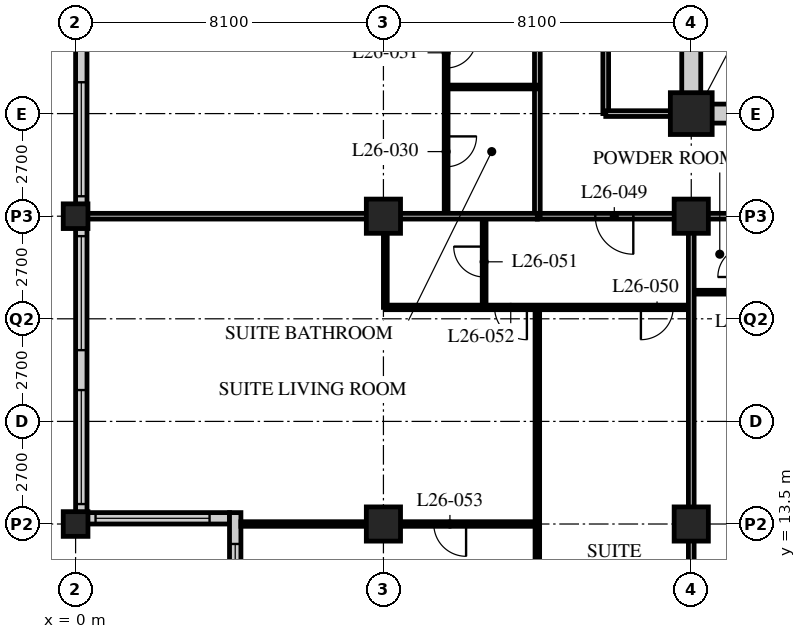
"""IFC4 building model, lengths in metres.
Left out: names, types, materials, properties, quantities, classifications, styles, units other than length and angle.
Written with IfcOpenShell. Run it as: python <this file> out.ifc"""

import sys

from ifc_helpers import new_model, si_unit, direction, frame, frame_2d, origin, origin_2d, place, context, subcontext, project, spatial, rectangle, hollow_rectangle, extrude, element, fill, save


model = new_model("IFC4")
c1 = context("Model", 3, precision=1e-05, world=origin(), true_north=direction((0.0, 1.0)))
c2 = subcontext(c1, "Body", "Model", "MODEL_VIEW")
j1 = project(units=[si_unit("LENGTHUNIT", "METRE"), si_unit("PLANEANGLEUNIT", "RADIAN")], contexts=[c1])
p1 = place(None, origin())
s1 = spatial("IfcSite", under=j1, at=p1, CompositionType="ELEMENT")
p2 = place(p1, origin())
s2 = spatial("IfcBuilding", under=s1, at=p2, CompositionType="ELEMENT")
p3 = place(p2, frame((0.0, 0.0, 106.8)))
s3 = spatial("IfcBuildingStorey", under=s2, at=p3, CompositionType="ELEMENT", Elevation=106.8)
for number, where, z_axis, x_axis in (
    (1, (0.0, 13.5, 0.0), (0.0, 0.0, 1.0), (1.0, 0.0, 0.0)),
    (2, (0.0, 21.6, 0.0), (0.0, 0.0, 1.0), (1.0, 0.0, 0.0)),
):
    element("IfcColumn", number, at=place(p3, frame(where, z_axis=z_axis, x_axis=x_axis)), inside=s3, PredefinedType="COLUMN", context=c2, shape_type="SweptSolid", body=[
        extrude(hollow_rectangle(XDim=0.65, YDim=0.65, WallThickness=0.055, at=origin_2d()), origin(), (0.0, 0.0, 1.0), 3.4),
    ])
for number, where, z_axis, x_axis in (
    (3, (8.1, 13.5, 0.0), (0.0, 0.0, 1.0), (1.0, 0.0, 0.0)),
    (4, (8.1, 21.6, 0.0), (0.0, 0.0, 1.0), (1.0, 0.0, 0.0)),
    (5, (16.2, 13.5, 0.0), (0.0, 0.0, 1.0), (1.0, 0.0, 0.0)),
    (6, (16.2, 21.6, 0.0), (0.0, 0.0, 1.0), (1.0, 0.0, 0.0)),
):
    element("IfcColumn", number, at=place(p3, frame(where, z_axis=z_axis, x_axis=x_axis)), inside=s3, PredefinedType="COLUMN", context=c2, shape_type="SweptSolid", body=[
        extrude(hollow_rectangle(XDim=0.9, YDim=0.9, WallThickness=0.09, at=origin_2d()), origin(), (0.0, 0.0, 1.0), 3.4),
    ])
p4 = place(p3, frame((16.2, 24.3, 0.0), z_axis=(0.0, 0.0, 1.0), x_axis=(1.0, 0.0, 0.0)))
e7 = element("IfcColumn", 7, at=p4, inside=s3, PredefinedType="COLUMN", context=c2, shape_type="SweptSolid", body=[
    extrude(hollow_rectangle(XDim=1.1, YDim=1.1, WallThickness=0.1, at=origin_2d()), origin(), (0.0, 0.0, 1.0), 3.4),
])
p5 = place(p3, frame((0.15, 45.6, 0.0), z_axis=(0.0, 0.0, 1.0), x_axis=(0.0, -1.0, 0.0)))
e8 = element("IfcWall", 8, at=p5, inside=s3, PredefinedType="SOLIDWALL", context=c2, shape_type="SweptSolid", body=[
    extrude(rectangle(XDim=32.1, YDim=0.3, at=frame_2d((16.05, 0.0))), origin(), (0.0, 0.0, 1.0), 3.19),
])
p6 = place(p5, frame((0.225, 0.0, 0.9)))
e9 = element("IfcOpeningElement", 9, at=p6, cuts=e8, PredefinedType="OPENING", context=c2, shape_type="SweptSolid", body=[
    extrude(rectangle(XDim=3.0, YDim=2.0, at=frame_2d((1.5, 1.0))), frame((0.0, 0.16, 0.0), z_axis=(0.0, -1.0, 0.0), x_axis=(1.0, 0.0, 0.0)), (0.0, 0.0, 1.0), 0.32),
])
p7 = place(p5, frame((4.275, 0.0, 0.9)))
e10 = element("IfcOpeningElement", 10, at=p7, cuts=e8, PredefinedType="OPENING", context=c2, shape_type="SweptSolid", body=[
    extrude(rectangle(XDim=3.0, YDim=2.0, at=frame_2d((1.5, 1.0))), frame((0.0, 0.16, 0.0), z_axis=(0.0, -1.0, 0.0), x_axis=(1.0, 0.0, 0.0)), (0.0, 0.0, 1.0), 0.32),
])
p8 = place(p5, frame((8.325, 0.0, 0.9)))
e11 = element("IfcOpeningElement", 11, at=p8, cuts=e8, PredefinedType="OPENING", context=c2, shape_type="SweptSolid", body=[
    extrude(rectangle(XDim=3.0, YDim=2.0, at=frame_2d((1.5, 1.0))), frame((0.0, 0.16, 0.0), z_axis=(0.0, -1.0, 0.0), x_axis=(1.0, 0.0, 0.0)), (0.0, 0.0, 1.0), 0.32),
])
p9 = place(p5, frame((12.375, 0.0, 0.9)))
e12 = element("IfcOpeningElement", 12, at=p9, cuts=e8, PredefinedType="OPENING", context=c2, shape_type="SweptSolid", body=[
    extrude(rectangle(XDim=3.0, YDim=2.0, at=frame_2d((1.5, 1.0))), frame((0.0, 0.16, 0.0), z_axis=(0.0, -1.0, 0.0), x_axis=(1.0, 0.0, 0.0)), (0.0, 0.0, 1.0), 0.32),
])
p10 = place(p5, frame((16.425, 0.0, 0.9)))
e13 = element("IfcOpeningElement", 13, at=p10, cuts=e8, PredefinedType="OPENING", context=c2, shape_type="SweptSolid", body=[
    extrude(rectangle(XDim=3.0, YDim=2.0, at=frame_2d((1.5, 1.0))), frame((0.0, 0.16, 0.0), z_axis=(0.0, -1.0, 0.0), x_axis=(1.0, 0.0, 0.0)), (0.0, 0.0, 1.0), 0.32),
])
p11 = place(p5, frame((20.475, 0.0, 0.9)))
e14 = element("IfcOpeningElement", 14, at=p11, cuts=e8, PredefinedType="OPENING", context=c2, shape_type="SweptSolid", body=[
    extrude(rectangle(XDim=3.0, YDim=2.0, at=frame_2d((1.5, 1.0))), frame((0.0, 0.16, 0.0), z_axis=(0.0, -1.0, 0.0), x_axis=(1.0, 0.0, 0.0)), (0.0, 0.0, 1.0), 0.32),
])
p12 = place(p5, frame((24.525, 0.0, 0.9)))
e15 = element("IfcOpeningElement", 15, at=p12, cuts=e8, PredefinedType="OPENING", context=c2, shape_type="SweptSolid", body=[
    extrude(rectangle(XDim=3.0, YDim=2.0, at=frame_2d((1.5, 1.0))), frame((0.0, 0.16, 0.0), z_axis=(0.0, -1.0, 0.0), x_axis=(1.0, 0.0, 0.0)), (0.0, 0.0, 1.0), 0.32),
])
p13 = place(p5, frame((28.575, 0.0, 0.9)))
e16 = element("IfcOpeningElement", 16, at=p13, cuts=e8, PredefinedType="OPENING", context=c2, shape_type="SweptSolid", body=[
    extrude(rectangle(XDim=3.0, YDim=2.0, at=frame_2d((1.5, 1.0))), frame((0.0, 0.16, 0.0), z_axis=(0.0, -1.0, 0.0), x_axis=(1.0, 0.0, 0.0)), (0.0, 0.0, 1.0), 0.32),
])
p14 = place(p3, frame((0.3, 13.65, 0.0), z_axis=(0.0, 0.0, 1.0), x_axis=(1.0, 0.0, 0.0)))
e17 = element("IfcWall", 17, at=p14, inside=s3, PredefinedType="SOLIDWALL", context=c2, shape_type="SweptSolid", body=[
    extrude(rectangle(XDim=3.75, YDim=0.3, at=frame_2d((1.875, 0.0))), origin(), (0.0, 0.0, 1.0), 3.19),
])
p15 = place(p14, frame((0.225, 0.0, 0.9)))
e18 = element("IfcOpeningElement", 18, at=p15, cuts=e17, PredefinedType="OPENING", context=c2, shape_type="SweptSolid", body=[
    extrude(rectangle(XDim=3.0, YDim=1.5, at=frame_2d((1.5, 0.75))), frame((0.0, 0.16, 0.0), z_axis=(0.0, -1.0, 0.0), x_axis=(1.0, 0.0, 0.0)), (0.0, 0.0, 1.0), 0.32),
])
p16 = place(p3, frame((4.2, 13.8, 0.0), z_axis=(0.0, 0.0, 1.0), x_axis=(0.0, -1.0, 0.0)))
e19 = element("IfcWall", 19, at=p16, inside=s3, PredefinedType="SOLIDWALL", context=c2, shape_type="SweptSolid", body=[
    extrude(rectangle(XDim=4.35, YDim=0.3, at=frame_2d((2.175, 0.0))), origin(), (0.0, 0.0, 1.0), 3.19),
])
p17 = place(p16, frame((0.825, 0.0, 0.9)))
e20 = element("IfcOpeningElement", 20, at=p17, cuts=e19, PredefinedType="OPENING", context=c2, shape_type="SweptSolid", body=[
    extrude(rectangle(XDim=3.0, YDim=1.5, at=frame_2d((1.5, 0.75))), frame((0.0, 0.16, 0.0), z_axis=(0.0, -1.0, 0.0), x_axis=(1.0, 0.0, 0.0)), (0.0, 0.0, 1.0), 0.32),
])
p18 = place(p3, frame((12.15, 21.6, 0.0), z_axis=(0.0, 0.0, 1.0), x_axis=(1.0, 0.0, 0.0)))
e21 = element("IfcWall", 21, at=p18, inside=s3, PredefinedType="PARTITIONING", context=c2, shape_type="SweptSolid", body=[
    extrude(rectangle(XDim=32.4, YDim=0.15, at=frame_2d((16.2, 0.0))), origin(), (0.0, 0.0, 1.0), 2.578),
])
p19 = place(p18, frame((5.95, 0.0, 0.0)))
e22 = element("IfcOpeningElement", 22, at=p19, cuts=e21, PredefinedType="OPENING", context=c2, shape_type="SweptSolid", body=[
    extrude(rectangle(XDim=1.0, YDim=2.1, at=frame_2d((0.5, 1.05))), frame((0.0, 0.085, 0.0), z_axis=(0.0, -1.0, 0.0), x_axis=(1.0, 0.0, 0.0)), (0.0, 0.0, 1.0), 0.17),
])
p20 = place(p18, frame((14.05, 0.0, 0.0)))
e23 = element("IfcOpeningElement", 23, at=p20, cuts=e21, PredefinedType="OPENING", context=c2, shape_type="SweptSolid", body=[
    extrude(rectangle(XDim=1.0, YDim=2.1, at=frame_2d((0.5, 1.05))), frame((0.0, 0.085, 0.0), z_axis=(0.0, -1.0, 0.0), x_axis=(1.0, 0.0, 0.0)), (0.0, 0.0, 1.0), 0.17),
])
p21 = place(p18, frame((22.15, 0.0, 0.0)))
e24 = element("IfcOpeningElement", 24, at=p21, cuts=e21, PredefinedType="OPENING", context=c2, shape_type="SweptSolid", body=[
    extrude(rectangle(XDim=1.0, YDim=2.1, at=frame_2d((0.5, 1.05))), frame((0.0, 0.085, 0.0), z_axis=(0.0, -1.0, 0.0), x_axis=(1.0, 0.0, 0.0)), (0.0, 0.0, 1.0), 0.17),
])
p22 = place(p18, frame((1.525, 0.0, 0.0)))
e25 = element("IfcOpeningElement", 25, at=p22, cuts=e21, PredefinedType="OPENING", context=c2, shape_type="SweptSolid", body=[
    extrude(rectangle(XDim=1.0, YDim=2.1, at=frame_2d((0.5, 1.05))), frame((0.0, 0.085, 0.0), z_axis=(0.0, -1.0, 0.0), x_axis=(1.0, 0.0, 0.0)), (0.0, 0.0, 1.0), 0.17),
])
p23 = place(p18, frame((29.875, 0.0, 0.0)))
e26 = element("IfcOpeningElement", 26, at=p23, cuts=e21, PredefinedType="OPENING", context=c2, shape_type="SweptSolid", body=[
    extrude(rectangle(XDim=1.0, YDim=2.1, at=frame_2d((0.5, 1.05))), frame((0.0, 0.085, 0.0), z_axis=(0.0, -1.0, 0.0), x_axis=(1.0, 0.0, 0.0)), (0.0, 0.0, 1.0), 0.17),
])
p24 = place(p3, frame((12.15, 21.6, 0.0), z_axis=(0.0, 0.0, 1.0), x_axis=(0.0, 1.0, 0.0)))
e27 = element("IfcWall", 27, at=p24, inside=s3, PredefinedType="PARTITIONING", context=c2, shape_type="SweptSolid", body=[
    extrude(rectangle(XDim=24.3, YDim=0.15, at=frame_2d((12.15, 0.0))), origin(), (0.0, 0.0, 1.0), 3.19),
])
p25 = place(p24, frame((5.45, 0.0, 0.0)))
e28 = element("IfcOpeningElement", 28, at=p25, cuts=e27, PredefinedType="OPENING", context=c2, shape_type="SweptSolid", body=[
    extrude(rectangle(XDim=1.0, YDim=2.1, at=frame_2d((0.5, 1.05))), frame((0.0, 0.085, 0.0), z_axis=(0.0, -1.0, 0.0), x_axis=(1.0, 0.0, 0.0)), (0.0, 0.0, 1.0), 0.17),
])
p26 = place(p24, frame((13.55, 0.0, 0.0)))
e29 = element("IfcOpeningElement", 29, at=p26, cuts=e27, PredefinedType="OPENING", context=c2, shape_type="SweptSolid", body=[
    extrude(rectangle(XDim=1.0, YDim=2.1, at=frame_2d((0.5, 1.05))), frame((0.0, 0.085, 0.0), z_axis=(0.0, -1.0, 0.0), x_axis=(1.0, 0.0, 0.0)), (0.0, 0.0, 1.0), 0.17),
])
p27 = place(p24, frame((21.65, 0.0, 0.0)))
e30 = element("IfcOpeningElement", 30, at=p27, cuts=e27, PredefinedType="OPENING", context=c2, shape_type="SweptSolid", body=[
    extrude(rectangle(XDim=1.0, YDim=2.1, at=frame_2d((0.5, 1.05))), frame((0.0, 0.085, 0.0), z_axis=(0.0, -1.0, 0.0), x_axis=(1.0, 0.0, 0.0)), (0.0, 0.0, 1.0), 0.17),
])
p28 = place(p3, frame((13.95, 44.1, 0.0), z_axis=(0.0, 0.0, 1.0), x_axis=(0.0, -1.0, 0.0)))
e31 = element("IfcWall", 31, at=p28, inside=s3, PredefinedType="PARTITIONING", context=c2, shape_type="SweptSolid", body=[
    extrude(rectangle(XDim=19.8, YDim=0.15, at=frame_2d((9.9, 0.0))), origin(), (0.0, 0.0, 1.0), 3.19),
])
p29 = place(p28, frame((15.25, 0.0, 0.0)))
e32 = element("IfcOpeningElement", 32, at=p29, cuts=e31, PredefinedType="OPENING", context=c2, shape_type="SweptSolid", body=[
    extrude(rectangle(XDim=1.0, YDim=2.1, at=frame_2d((0.5, 1.05))), frame((0.0, 0.085, 0.0), z_axis=(0.0, -1.0, 0.0), x_axis=(1.0, 0.0, 0.0)), (0.0, 0.0, 1.0), 0.17),
])
p30 = place(p28, frame((7.15, 0.0, 0.0)))
e33 = element("IfcOpeningElement", 33, at=p30, cuts=e31, PredefinedType="OPENING", context=c2, shape_type="SweptSolid", body=[
    extrude(rectangle(XDim=1.0, YDim=2.1, at=frame_2d((0.5, 1.05))), frame((0.0, 0.085, 0.0), z_axis=(0.0, -1.0, 0.0), x_axis=(1.0, 0.0, 0.0)), (0.0, 0.0, 1.0), 0.17),
])
p31 = place(p3, frame((13.95, 24.3, 0.0), z_axis=(0.0, 0.0, 1.0), x_axis=(1.0, 0.0, 0.0)))
e34 = element("IfcWall", 34, at=p31, inside=s3, PredefinedType="PARTITIONING", context=c2, shape_type="SweptSolid", body=[
    extrude(rectangle(XDim=2.05, YDim=0.15, at=frame_2d((1.025, 0.0))), origin(), (0.0, 0.0, 1.0), 3.19),
])
p32 = place(p3, frame((16.2, 19.6, 0.0), z_axis=(0.0, 0.0, 1.0), x_axis=(1.0, 0.0, 0.0)))
e35 = element("IfcWall", 35, at=p32, inside=s3, PredefinedType="PARTITIONING", context=c2, shape_type="SweptSolid", body=[
    extrude(rectangle(XDim=1.5, YDim=0.1, at=frame_2d((0.75, 0.0))), origin(), (0.0, 0.0, 1.0), 3.19),
])
p33 = place(p3, frame((9.75, 21.6, 0.0), z_axis=(0.0, 0.0, 1.0), x_axis=(0.0, 1.0, 0.0)))
e36 = element("IfcWall", 36, at=p33, inside=s3, PredefinedType="PARTITIONING", context=c2, shape_type="SweptSolid", body=[
    extrude(rectangle(XDim=5.2, YDim=0.1, at=frame_2d((2.6, 0.0))), origin(), (0.0, 0.0, 1.0), 3.19),
])
p34 = place(p33, frame((1.3, 0.0, 0.0)))
e37 = element("IfcOpeningElement", 37, at=p34, cuts=e36, PredefinedType="OPENING", context=c2, shape_type="SweptSolid", body=[
    extrude(rectangle(XDim=0.8, YDim=2.1, at=frame_2d((0.4, 1.05))), frame((0.0, 0.06, 0.0), z_axis=(0.0, -1.0, 0.0), x_axis=(1.0, 0.0, 0.0)), (0.0, 0.0, 1.0), 0.12),
])
p35 = place(p33, frame((3.9, 0.0, 0.0)))
e38 = element("IfcOpeningElement", 38, at=p35, cuts=e36, PredefinedType="OPENING", context=c2, shape_type="SweptSolid", body=[
    extrude(rectangle(XDim=0.8, YDim=2.1, at=frame_2d((0.4, 1.05))), frame((0.0, 0.06, 0.0), z_axis=(0.0, -1.0, 0.0), x_axis=(1.0, 0.0, 0.0)), (0.0, 0.0, 1.0), 0.12),
])
p36 = place(p3, frame((12.15, 25.0, 0.0), z_axis=(0.0, 0.0, 1.0), x_axis=(-1.0, 0.0, 0.0)))
e39 = element("IfcWall", 39, at=p36, inside=s3, PredefinedType="PARTITIONING", context=c2, shape_type="SweptSolid", body=[
    extrude(rectangle(XDim=2.4, YDim=0.1, at=frame_2d((1.2, 0.0))), origin(), (0.0, 0.0, 1.0), 3.19),
])
p37 = place(p3, frame((10.75, 21.6, 0.0), z_axis=(0.0, 0.0, 1.0), x_axis=(0.0, -1.0, 0.0)))
e40 = element("IfcWall", 40, at=p37, inside=s3, PredefinedType="PARTITIONING", context=c2, shape_type="SweptSolid", body=[
    extrude(rectangle(XDim=2.4, YDim=0.1, at=frame_2d((1.2, 0.0))), origin(), (0.0, 0.0, 1.0), 3.19),
])
p38 = place(p37, frame((0.8, 0.0, 0.0)))
e41 = element("IfcOpeningElement", 41, at=p38, cuts=e40, PredefinedType="OPENING", context=c2, shape_type="SweptSolid", body=[
    extrude(rectangle(XDim=0.8, YDim=2.1, at=frame_2d((0.4, 1.05))), frame((0.0, 0.06, 0.0), z_axis=(0.0, -1.0, 0.0), x_axis=(1.0, 0.0, 0.0)), (0.0, 0.0, 1.0), 0.12),
])
p39 = place(p3, frame((8.15, 21.6, 0.0), z_axis=(0.0, 0.0, 1.0), x_axis=(0.0, -1.0, 0.0)))
e42 = element("IfcWall", 42, at=p39, inside=s3, PredefinedType="PARTITIONING", context=c2, shape_type="SweptSolid", body=[
    extrude(rectangle(XDim=2.4, YDim=0.1, at=frame_2d((1.2, 0.0))), origin(), (0.0, 0.0, 1.0), 2.578),
])
p40 = place(p3, frame((8.15, 19.2, 0.0), z_axis=(0.0, 0.0, 1.0), x_axis=(1.0, 0.0, 0.0)))
e43 = element("IfcWall", 43, at=p40, inside=s3, PredefinedType="PARTITIONING", context=c2, shape_type="SweptSolid", body=[
    extrude(rectangle(XDim=8.05, YDim=0.12, at=frame_2d((4.025, 0.0))), origin(), (0.0, 0.0, 1.0), 3.19),
])
p41 = place(p40, frame((6.725, 0.0, 0.0)))
e44 = element("IfcOpeningElement", 44, at=p41, cuts=e43, PredefinedType="OPENING", context=c2, shape_type="SweptSolid", body=[
    extrude(rectangle(XDim=0.85, YDim=2.1, at=frame_2d((0.425, 1.05))), frame((0.0, 0.07, 0.0), z_axis=(0.0, -1.0, 0.0), x_axis=(1.0, 0.0, 0.0)), (0.0, 0.0, 1.0), 0.14),
])
p42 = place(p40, frame((2.875, 0.0, 0.0)))
e45 = element("IfcOpeningElement", 45, at=p42, cuts=e43, PredefinedType="OPENING", context=c2, shape_type="SweptSolid", body=[
    extrude(rectangle(XDim=0.85, YDim=2.1, at=frame_2d((0.425, 1.05))), frame((0.0, 0.07, 0.0), z_axis=(0.0, -1.0, 0.0), x_axis=(1.0, 0.0, 0.0)), (0.0, 0.0, 1.0), 0.14),
])
p43 = place(p3, frame((12.15, 19.2, 0.0), z_axis=(0.0, 0.0, 1.0), x_axis=(0.0, -1.0, 0.0)))
e46 = element("IfcWall", 46, at=p43, inside=s3, PredefinedType="PARTITIONING", context=c2, shape_type="SweptSolid", body=[
    extrude(rectangle(XDim=13.5, YDim=0.12, at=frame_2d((6.75, 0.0))), origin(), (0.0, 0.0, 1.0), 3.19),
])
p44 = place(p3, frame((12.15, 13.5, 0.0), z_axis=(0.0, 0.0, 1.0), x_axis=(-1.0, 0.0, 0.0)))
e47 = element("IfcWall", 47, at=p44, inside=s3, PredefinedType="PARTITIONING", context=c2, shape_type="SweptSolid", body=[
    extrude(rectangle(XDim=7.8, YDim=0.12, at=frame_2d((3.9, 0.0))), origin(), (0.0, 0.0, 1.0), 2.578),
])
p45 = place(p44, frame((1.875, 0.0, 0.0)))
e48 = element("IfcOpeningElement", 48, at=p45, cuts=e47, PredefinedType="OPENING", context=c2, shape_type="SweptSolid", body=[
    extrude(rectangle(XDim=0.85, YDim=2.1, at=frame_2d((0.425, 1.05))), frame((0.0, 0.07, 0.0), z_axis=(0.0, -1.0, 0.0), x_axis=(1.0, 0.0, 0.0)), (0.0, 0.0, 1.0), 0.14),
])
p46 = place(p3, frame((0.3, 21.6, 0.0), z_axis=(0.0, 0.0, 1.0), x_axis=(1.0, 0.0, 0.0)))
e49 = element("IfcWall", 49, at=p46, inside=s3, PredefinedType="PARTITIONING", context=c2, shape_type="SweptSolid", body=[
    extrude(rectangle(XDim=11.85, YDim=0.15, at=frame_2d((5.925, 0.0))), origin(), (0.0, 0.0, 1.0), 2.578),
])
p47 = place(p3, frame((16.2, 21.6, 0.0), z_axis=(0.0, 0.0, 1.0), x_axis=(0.0, -1.0, 0.0)))
e50 = element("IfcWall", 50, at=p47, inside=s3, PredefinedType="PARTITIONING", context=c2, shape_type="SweptSolid", body=[
    extrude(rectangle(XDim=15.9, YDim=0.15, at=frame_2d((7.95, 0.0))), origin(), (0.0, 0.0, 1.0), 2.578),
])
p48 = place(p3, frame((15.95, 24.3, 0.0), z_axis=(0.0, 0.0, 1.0), x_axis=(1.0, 0.0, 0.0)))
e51 = element("IfcWall", 51, at=p48, inside=s3, PredefinedType="SOLIDWALL", context=c2, shape_type="SweptSolid", body=[
    extrude(rectangle(XDim=24.8, YDim=0.5, at=frame_2d((12.4, 0.0))), origin(), (0.0, 0.0, 1.0), 2.54),
])
p49 = place(p48, frame((11.5, 0.0, 0.0)))
e52 = element("IfcOpeningElement", 52, at=p49, cuts=e51, PredefinedType="OPENING", context=c2, shape_type="SweptSolid", body=[
    extrude(rectangle(XDim=1.8, YDim=2.4, at=frame_2d((0.9, 1.2))), frame((0.0, 0.26, 0.0), z_axis=(0.0, -1.0, 0.0), x_axis=(1.0, 0.0, 0.0)), (0.0, 0.0, 1.0), 0.52),
])
p50 = place(p3, frame((16.2, 24.55, 0.0), z_axis=(0.0, 0.0, 1.0), x_axis=(0.0, 1.0, 0.0)))
e53 = element("IfcWall", 53, at=p50, inside=s3, PredefinedType="SOLIDWALL", context=c2, shape_type="SweptSolid", body=[
    extrude(rectangle(XDim=15.7, YDim=0.5, at=frame_2d((7.85, 0.0))), origin(), (0.0, 0.0, 1.0), 2.578),
])
p51 = place(p11, origin())
e54 = element("IfcWindow", 54, at=p51, inside=s3, PartitioningType="SINGLE_PANEL", PredefinedType="WINDOW", context=c2, shape_type="SweptSolid", body=[
    extrude(rectangle(XDim=3.0, YDim=2.0, at=frame_2d((1.5, 1.0))), frame((0.0, 0.03, 0.0), z_axis=(0.0, -1.0, 0.0), x_axis=(1.0, 0.0, 0.0)), (0.0, 0.0, 1.0), 0.06),
])
fill(e14, e54)
p52 = place(p12, origin())
e55 = element("IfcWindow", 55, at=p52, inside=s3, PartitioningType="SINGLE_PANEL", PredefinedType="WINDOW", context=c2, shape_type="SweptSolid", body=[
    extrude(rectangle(XDim=3.0, YDim=2.0, at=frame_2d((1.5, 1.0))), frame((0.0, 0.03, 0.0), z_axis=(0.0, -1.0, 0.0), x_axis=(1.0, 0.0, 0.0)), (0.0, 0.0, 1.0), 0.06),
])
fill(e15, e55)
p53 = place(p13, origin())
e56 = element("IfcWindow", 56, at=p53, inside=s3, PartitioningType="SINGLE_PANEL", PredefinedType="WINDOW", context=c2, shape_type="SweptSolid", body=[
    extrude(rectangle(XDim=3.0, YDim=2.0, at=frame_2d((1.5, 1.0))), frame((0.0, 0.03, 0.0), z_axis=(0.0, -1.0, 0.0), x_axis=(1.0, 0.0, 0.0)), (0.0, 0.0, 1.0), 0.06),
])
fill(e16, e56)
p54 = place(p15, origin())
e57 = element("IfcWindow", 57, at=p54, inside=s3, PartitioningType="SINGLE_PANEL", PredefinedType="WINDOW", context=c2, shape_type="SweptSolid", body=[
    extrude(rectangle(XDim=3.0, YDim=1.5, at=frame_2d((1.5, 0.75))), frame((0.0, 0.03, 0.0), z_axis=(0.0, -1.0, 0.0), x_axis=(1.0, 0.0, 0.0)), (0.0, 0.0, 1.0), 0.06),
])
fill(e18, e57)
p55 = place(p17, origin())
e58 = element("IfcWindow", 58, at=p55, inside=s3, PartitioningType="SINGLE_PANEL", PredefinedType="WINDOW", context=c2, shape_type="SweptSolid", body=[
    extrude(rectangle(XDim=3.0, YDim=1.5, at=frame_2d((1.5, 0.75))), frame((0.0, 0.03, 0.0), z_axis=(0.0, -1.0, 0.0), x_axis=(1.0, 0.0, 0.0)), (0.0, 0.0, 1.0), 0.06),
])
fill(e20, e58)
p56 = place(p34, origin())
e59 = element("IfcDoor", 59, at=p56, inside=s3, OperationType="SINGLE_SWING_LEFT", PredefinedType="DOOR", context=c2, shape_type="SweptSolid", body=[
    extrude(rectangle(XDim=0.8, YDim=2.1, at=frame_2d((0.4, 1.05))), frame((0.0, 0.025, 0.0), z_axis=(0.0, -1.0, 0.0), x_axis=(1.0, 0.0, 0.0)), (0.0, 0.0, 1.0), 0.05),
])
fill(e37, e59)
p57 = place(p35, origin())
e60 = element("IfcDoor", 60, at=p57, inside=s3, OperationType="SINGLE_SWING_LEFT", PredefinedType="DOOR", context=c2, shape_type="SweptSolid", body=[
    extrude(rectangle(XDim=0.8, YDim=2.1, at=frame_2d((0.4, 1.05))), frame((0.0, 0.025, 0.0), z_axis=(0.0, -1.0, 0.0), x_axis=(1.0, 0.0, 0.0)), (0.0, 0.0, 1.0), 0.05),
])
fill(e38, e60)
p58 = place(p22, origin())
e61 = element("IfcDoor", 61, at=p58, inside=s3, OperationType="SINGLE_SWING_LEFT", PredefinedType="DOOR", context=c2, shape_type="SweptSolid", body=[
    extrude(rectangle(XDim=1.0, YDim=2.1, at=frame_2d((0.5, 1.05))), frame((0.0, 0.025, 0.0), z_axis=(0.0, -1.0, 0.0), x_axis=(1.0, 0.0, 0.0)), (0.0, 0.0, 1.0), 0.05),
])
fill(e25, e61)
p59 = place(p41, origin())
e62 = element("IfcDoor", 62, at=p59, inside=s3, OperationType="SINGLE_SWING_RIGHT", PredefinedType="DOOR", context=c2, shape_type="SweptSolid", body=[
    extrude(rectangle(XDim=0.85, YDim=2.1, at=frame_2d((0.425, 1.05))), frame((0.0, 0.025, 0.0), z_axis=(0.0, -1.0, 0.0), x_axis=(1.0, 0.0, 0.0)), (0.0, 0.0, 1.0), 0.05),
])
fill(e44, e62)
p60 = place(p38, origin())
e63 = element("IfcDoor", 63, at=p60, inside=s3, OperationType="SINGLE_SWING_RIGHT", PredefinedType="DOOR", context=c2, shape_type="SweptSolid", body=[
    extrude(rectangle(XDim=0.8, YDim=2.1, at=frame_2d((0.4, 1.05))), frame((0.0, 0.025, 0.0), z_axis=(0.0, -1.0, 0.0), x_axis=(1.0, 0.0, 0.0)), (0.0, 0.0, 1.0), 0.05),
])
fill(e41, e63)
p61 = place(p42, origin())
e64 = element("IfcDoor", 64, at=p61, inside=s3, OperationType="SINGLE_SWING_LEFT", PredefinedType="DOOR", context=c2, shape_type="SweptSolid", body=[
    extrude(rectangle(XDim=0.85, YDim=2.1, at=frame_2d((0.425, 1.05))), frame((0.0, 0.025, 0.0), z_axis=(0.0, -1.0, 0.0), x_axis=(1.0, 0.0, 0.0)), (0.0, 0.0, 1.0), 0.05),
])
fill(e45, e64)
p62 = place(p45, origin())
e65 = element("IfcDoor", 65, at=p62, inside=s3, OperationType="SINGLE_SWING_LEFT", PredefinedType="DOOR", context=c2, shape_type="SweptSolid", body=[
    extrude(rectangle(XDim=0.85, YDim=2.1, at=frame_2d((0.425, 1.05))), frame((0.0, 0.025, 0.0), z_axis=(0.0, -1.0, 0.0), x_axis=(1.0, 0.0, 0.0)), (0.0, 0.0, 1.0), 0.05),
])
fill(e48, e65)
save(model, sys.argv[1])
